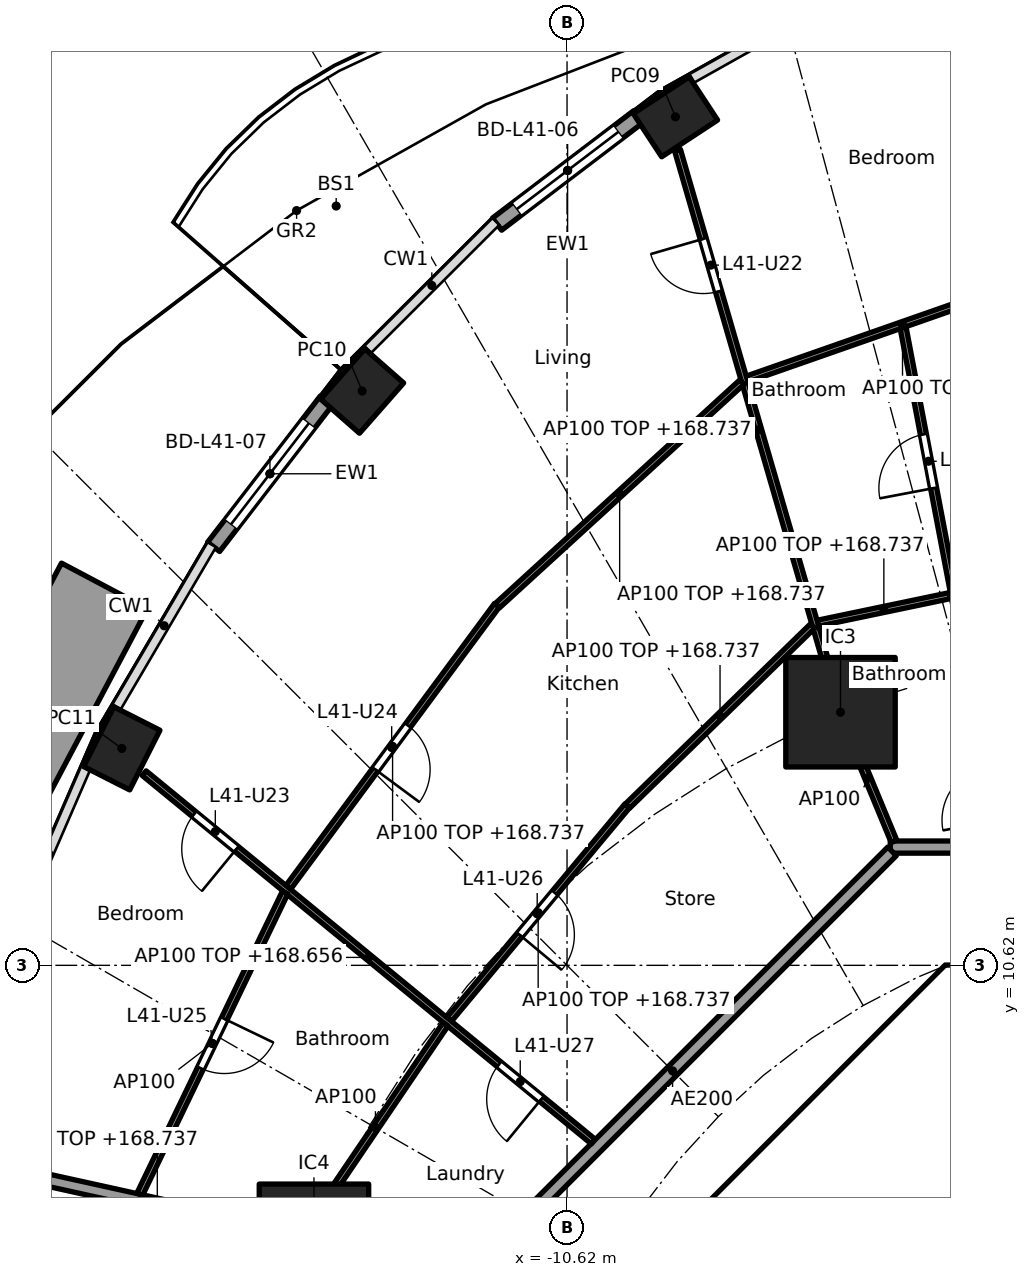
"""IFC4 building model, lengths in metres.
Left out: names, types, materials, properties, quantities, classifications, styles, units other than length and angle.
Written with IfcOpenShell. Run it as: python <this file> out.ifc"""

import sys

from ifc_helpers import new_model, si_unit, direction, frame, frame_2d, origin, origin_2d, place, context, subcontext, project, spatial, polyline, rectangle, hollow_rectangle, outline, extrude, element, fill, save


model = new_model("IFC4")
c1 = context("Model", 3, precision=1e-05, world=origin(), true_north=direction((0.0, 1.0)))
c2 = subcontext(c1, "Body", "Model", "MODEL_VIEW")
j1 = project(units=[si_unit("LENGTHUNIT", "METRE"), si_unit("PLANEANGLEUNIT", "RADIAN")], contexts=[c1])
p1 = place(None, origin())
s1 = spatial("IfcSite", under=j1, at=p1, CompositionType="ELEMENT")
p2 = place(p1, origin())
s2 = spatial("IfcBuilding", under=s1, at=p2, CompositionType="ELEMENT")
p3 = place(p2, frame((0.0, 0.0, 165.9)))
s3 = spatial("IfcBuildingStorey", under=s2, at=p3, CompositionType="ELEMENT", Elevation=165.9)
for number, where, z_axis, x_axis in (
    (1, (-8.837, 24.573, -0.26), (0.0, 0.0, 1.0), (-0.836, -0.549, 0.0)),
    (2, (-13.989, 20.064, -0.26), (0.0, 0.0, 1.0), (-0.66, -0.751, 0.0)),
    (3, (-17.942, 14.188, -0.26), (0.0, 0.0, 1.0), (-0.452, -0.892, 0.0)),
):
    element("IfcColumn", number, at=place(p3, frame(where, z_axis=z_axis, x_axis=x_axis)), inside=s3, PredefinedType="COLUMN", context=c2, shape_type="SweptSolid", body=[
        extrude(hollow_rectangle(XDim=1.1, YDim=0.85, WallThickness=0.036, at=origin_2d()), origin(), (0.0, 0.0, 1.0), 3.96),
    ])
for number, where, z_axis, x_axis in (
    (4, (-6.123, 14.782, 0.0), (0.0, 0.0, 1.0), (1.0, 0.0, 0.0)),
    (5, (-14.782, 6.123, 0.0), (0.0, 0.0, 1.0), (1.0, 0.0, 0.0)),
):
    element("IfcColumn", number, at=place(p3, frame(where, z_axis=z_axis, x_axis=x_axis)), inside=s3, PredefinedType="COLUMN", context=c2, shape_type="SweptSolid", body=[
        extrude(rectangle(XDim=1.8, YDim=1.8, at=origin_2d()), origin(), (0.0, 0.0, 1.0), 3.7),
    ])
p4 = place(p3, frame((-11.772, 22.809, 0.0), z_axis=(0.0, 0.0, 1.0), x_axis=(0.796055733703, 0.60522332146, 0.0)))
e6 = element("IfcWall", 6, at=p4, inside=s3, PredefinedType="SOLIDWALL", context=c2, shape_type="SweptSolid", body=[
    extrude(rectangle(XDim=2.917, YDim=0.25, at=frame_2d((1.458, 0.0))), origin(), (0.0, 0.0, 1.0), 3.44),
])
p5 = place(p4, frame((0.408, 0.0, 0.0)))
e7 = element("IfcOpeningElement", 7, at=p5, cuts=e6, PredefinedType="OPENING", context=c2, shape_type="SweptSolid", body=[
    extrude(rectangle(XDim=2.1, YDim=2.4, at=frame_2d((1.05, 1.2))), frame((0.0, 0.135, 0.0), z_axis=(0.0, -1.0, 0.0), x_axis=(1.0, 0.0, 0.0)), (0.0, 0.0, 1.0), 0.27),
])
p6 = place(p3, frame((-16.432, 17.502, 0.0), z_axis=(0.0, 0.0, 1.0), x_axis=(0.610437428894, 0.79206448311, 0.0)))
e8 = element("IfcWall", 8, at=p6, inside=s3, PredefinedType="SOLIDWALL", context=c2, shape_type="SweptSolid", body=[
    extrude(rectangle(XDim=3.035, YDim=0.25, at=frame_2d((1.518, 0.0))), origin(), (0.0, 0.0, 1.0), 3.44),
])
p7 = place(p6, frame((0.468, 0.0, 0.0)))
e9 = element("IfcOpeningElement", 9, at=p7, cuts=e8, PredefinedType="OPENING", context=c2, shape_type="SweptSolid", body=[
    extrude(rectangle(XDim=2.1, YDim=2.4, at=frame_2d((1.05, 1.2))), frame((0.0, 0.135, 0.0), z_axis=(0.0, -1.0, 0.0), x_axis=(1.0, 0.0, 0.0)), (0.0, 0.0, 1.0), 0.27),
])
p8 = place(p3, frame((-18.227, 16.86, 0.0), z_axis=(0.0, 0.0, 1.0), x_axis=(-0.467931103726, -0.883764947351, 0.0)))
e10 = element("IfcWall", 10, at=p8, inside=s3, PredefinedType="SOLIDWALL", context=c2, shape_type="SweptSolid", body=[
    extrude(rectangle(XDim=5.947, YDim=1.6, at=frame_2d((2.973, 0.0))), origin(), (0.0, 0.0, 1.0), 1.1),
])
p9 = place(p3, frame((-4.613, 9.988, 0.0), z_axis=(0.0, 0.0, 1.0), x_axis=(-0.707106781187, -0.707106781187, 0.0)))
e11 = element("IfcWall", 11, at=p9, inside=s3, PredefinedType="SHEAR", context=c2, shape_type="SweptSolid", body=[
    extrude(rectangle(XDim=7.602, YDim=0.6, at=frame_2d((3.801, 0.0))), origin(), (0.0, 0.0, 1.0), 3.44),
])
p10 = place(p9, frame((0.351, 0.0, 0.0)))
e12 = element("IfcOpeningElement", 12, at=p10, cuts=e11, PredefinedType="OPENING", context=c2, shape_type="SweptSolid", body=[
    extrude(rectangle(XDim=1.1, YDim=2.1, at=frame_2d((0.55, 1.05))), frame((0.0, 0.31, 0.0), z_axis=(0.0, -1.0, 0.0), x_axis=(1.0, 0.0, 0.0)), (0.0, 0.0, 1.0), 0.62),
])
p11 = place(p3, frame((-5.8, 4.3, 0.0), z_axis=(0.0, 0.0, 1.0), x_axis=(0.0, 1.0, 0.0)))
e13 = element("IfcWall", 13, at=p11, inside=s3, PredefinedType="PARTITIONING", context=c2, shape_type="SweptSolid", body=[
    extrude(rectangle(XDim=3.927, YDim=0.15, at=frame_2d((1.963, 0.0))), origin(), (0.0, 0.0, 1.0), 3.44),
])
p12 = place(p11, frame((1.551, 0.0, 0.0)))
e14 = element("IfcOpeningElement", 14, at=p12, cuts=e13, PredefinedType="OPENING", context=c2, shape_type="SweptSolid", body=[
    extrude(rectangle(XDim=0.9, YDim=2.1, at=frame_2d((0.45, 1.05))), frame((0.0, 0.085, 0.0), z_axis=(0.0, -1.0, 0.0), x_axis=(1.0, 0.0, 0.0)), (0.0, 0.0, 1.0), 0.17),
])
p13 = place(p3, origin())
e15 = element("IfcWall", 15, at=p13, inside=s3, PredefinedType="SHEAR", context=c2, shape_type="SweptSolid", body=[
    extrude(outline(polyline([(-4.152, 10.025), (-4.401, 9.776), (-4.825, 10.2), (-4.401, 10.625), (4.401, 10.625), (4.825, 10.2), (4.401, 9.776), (4.152, 10.025), (-4.152, 10.025)])), origin(), (0.0, 0.0, 1.0), 3.44),
])
p14 = place(p3, frame((-14.831, 6.134, 0.0), z_axis=(0.0, 0.0, 1.0), x_axis=(-0.976568396888, 0.215207263354, 0.0)))
e16 = element("IfcWall", 16, at=p14, inside=s3, PredefinedType="PARTITIONING", context=c2, shape_type="SweptSolid", body=[
    extrude(rectangle(XDim=5.177, YDim=0.2, at=frame_2d((2.588, 0.0))), origin(), (0.0, 0.0, 1.0), 2.837),
])
p15 = place(p3, frame((5.104, 12.565, 0.0), z_axis=(0.0, 0.0, 1.0), x_axis=(-1.0, 0.0, 0.0)))
e17 = element("IfcWall", 17, at=p15, inside=s3, PredefinedType="PARTITIONING", context=c2, shape_type="SweptSolid", body=[
    extrude(rectangle(XDim=10.409, YDim=0.2, at=frame_2d((5.205, 0.0))), origin(), (0.0, 0.0, 1.0), 3.44),
])
p16 = place(p15, frame((6.339, 0.0, 0.0)))
e18 = element("IfcOpeningElement", 18, at=p16, cuts=e17, PredefinedType="OPENING", context=c2, shape_type="SweptSolid", body=[
    extrude(rectangle(XDim=1.0, YDim=2.1, at=frame_2d((0.5, 1.05))), frame((0.0, 0.11, 0.0), z_axis=(0.0, -1.0, 0.0), x_axis=(1.0, 0.0, 0.0)), (0.0, 0.0, 1.0), 0.22),
])
p17 = place(p3, frame((-5.275, 12.494, 0.0), z_axis=(0.0, 0.0, 1.0), x_axis=(-0.707106781187, -0.707106781187, 0.0)))
e19 = element("IfcWall", 19, at=p17, inside=s3, PredefinedType="PARTITIONING", context=c2, shape_type="SweptSolid", body=[
    extrude(rectangle(XDim=10.209, YDim=0.2, at=frame_2d((5.104, 0.0))), origin(), (0.0, 0.0, 1.0), 3.44),
])
p18 = place(p3, frame((-2.546, 22.051, 0.0), z_axis=(0.0, 0.0, 1.0), x_axis=(-0.943911038661, -0.330199865375, 0.0)))
e20 = element("IfcWall", 20, at=p18, inside=s3, PredefinedType="PARTITIONING", context=c2, shape_type="SweptSolid", body=[
    extrude(rectangle(XDim=5.417, YDim=0.1, at=frame_2d((2.709, 0.0))), origin(), (0.0, 0.0, 1.0), 2.837),
])
p19 = place(p3, frame((-3.488, 12.663, 0.0), z_axis=(0.0, 0.0, 1.0), x_axis=(-0.186783185485, 0.982401161247, 0.0)))
e21 = element("IfcWall", 21, at=p19, inside=s3, PredefinedType="PARTITIONING", context=c2, shape_type="SweptSolid", body=[
    extrude(rectangle(XDim=8.595, YDim=0.1, at=frame_2d((4.298, 0.0))), origin(), (0.0, 0.0, 1.0), 2.756),
])
p20 = place(p19, frame((0.35, 0.0, 0.0)))
e22 = element("IfcOpeningElement", 22, at=p20, cuts=e21, PredefinedType="OPENING", context=c2, shape_type="SweptSolid", body=[
    extrude(rectangle(XDim=0.9, YDim=2.1, at=frame_2d((0.45, 1.05))), frame((0.0, 0.06, 0.0), z_axis=(0.0, -1.0, 0.0), x_axis=(1.0, 0.0, 0.0)), (0.0, 0.0, 1.0), 0.12),
])
p21 = place(p19, frame((5.908, 0.0, 0.0)))
e23 = element("IfcOpeningElement", 23, at=p21, cuts=e21, PredefinedType="OPENING", context=c2, shape_type="SweptSolid", body=[
    extrude(rectangle(XDim=0.9, YDim=2.1, at=frame_2d((0.45, 1.05))), frame((0.0, 0.06, 0.0), z_axis=(0.0, -1.0, 0.0), x_axis=(1.0, 0.0, 0.0)), (0.0, 0.0, 1.0), 0.12),
])
p22 = place(p3, frame((-4.324, 16.699, 0.0), z_axis=(0.0, 0.0, 1.0), x_axis=(-0.978908011866, -0.204301503432, 0.0)))
e24 = element("IfcWall", 24, at=p22, inside=s3, PredefinedType="PARTITIONING", context=c2, shape_type="SweptSolid", body=[
    extrude(rectangle(XDim=2.218, YDim=0.1, at=frame_2d((1.109, 0.0))), origin(), (0.0, 0.0, 1.0), 2.837),
])
p23 = place(p3, frame((-5.243, 12.657, 0.0), z_axis=(0.0, 0.0, 1.0), x_axis=(-0.382719158442, 0.923864733477, 0.0)))
e25 = element("IfcWall", 25, at=p23, inside=s3, PredefinedType="PARTITIONING", context=c2, shape_type="SweptSolid", body=[
    extrude(rectangle(XDim=2.25, YDim=0.1, at=frame_2d((1.125, 0.0))), origin(), (0.0, 0.0, 1.0), 3.44),
])
p24 = place(p3, frame((-6.137, 14.83, 0.0), z_axis=(0.0, 0.0, 1.0), x_axis=(-0.278461169897, 0.96044748782, 0.0)))
e26 = element("IfcWall", 26, at=p24, inside=s3, PredefinedType="PARTITIONING", context=c2, shape_type="SweptSolid", body=[
    extrude(rectangle(XDim=9.573, YDim=0.1, at=frame_2d((4.787, 0.0))), origin(), (0.0, 0.0, 1.0), 2.837),
])
p25 = place(p24, frame((7.156, 0.0, 0.0)))
e27 = element("IfcOpeningElement", 27, at=p25, cuts=e26, PredefinedType="OPENING", context=c2, shape_type="SweptSolid", body=[
    extrude(rectangle(XDim=0.9, YDim=2.1, at=frame_2d((0.45, 1.05))), frame((0.0, 0.06, 0.0), z_axis=(0.0, -1.0, 0.0), x_axis=(1.0, 0.0, 0.0)), (0.0, 0.0, 1.0), 0.12),
])
p26 = place(p3, frame((-6.58, 16.201, 0.0), z_axis=(0.0, 0.0, 1.0), x_axis=(-0.716946269374, -0.697128429223, 0.0)))
e28 = element("IfcWall", 28, at=p26, inside=s3, PredefinedType="PARTITIONING", context=c2, shape_type="SweptSolid", body=[
    extrude(rectangle(XDim=4.25, YDim=0.1, at=frame_2d((2.125, 0.0))), origin(), (0.0, 0.0, 1.0), 2.837),
])
p27 = place(p3, frame((-7.744, 20.212, 0.0), z_axis=(0.0, 0.0, 1.0), x_axis=(-0.738051761282, -0.674744097913, 0.0)))
e29 = element("IfcWall", 29, at=p27, inside=s3, PredefinedType="PARTITIONING", context=c2, shape_type="SweptSolid", body=[
    extrude(rectangle(XDim=5.449, YDim=0.1, at=frame_2d((2.725, 0.0))), origin(), (0.0, 0.0, 1.0), 2.837),
])
p28 = place(p3, frame((-9.631, 13.242, 0.0), z_axis=(0.0, 0.0, 1.0), x_axis=(-0.640315711982, -0.768111833647, 0.0)))
e30 = element("IfcWall", 30, at=p28, inside=s3, PredefinedType="PARTITIONING", context=c2, shape_type="SweptSolid", body=[
    extrude(rectangle(XDim=4.572, YDim=0.1, at=frame_2d((2.286, 0.0))), origin(), (0.0, 0.0, 1.0), 2.837),
])
p29 = place(p28, frame((1.861, 0.0, 0.0)))
e31 = element("IfcOpeningElement", 31, at=p29, cuts=e30, PredefinedType="OPENING", context=c2, shape_type="SweptSolid", body=[
    extrude(rectangle(XDim=0.9, YDim=2.1, at=frame_2d((0.45, 1.05))), frame((0.0, 0.06, 0.0), z_axis=(0.0, -1.0, 0.0), x_axis=(1.0, 0.0, 0.0)), (0.0, 0.0, 1.0), 0.12),
])
p30 = place(p3, frame((-11.773, 16.542, 0.0), z_axis=(0.0, 0.0, 1.0), x_axis=(-0.594694305999, -0.803951915485, 0.0)))
e32 = element("IfcWall", 32, at=p30, inside=s3, PredefinedType="PARTITIONING", context=c2, shape_type="SweptSolid", body=[
    extrude(rectangle(XDim=5.772, YDim=0.1, at=frame_2d((2.886, 0.0))), origin(), (0.0, 0.0, 1.0), 2.837),
])
p31 = place(p30, frame((2.461, 0.0, 0.0)))
e33 = element("IfcOpeningElement", 33, at=p31, cuts=e32, PredefinedType="OPENING", context=c2, shape_type="SweptSolid", body=[
    extrude(rectangle(XDim=0.9, YDim=2.1, at=frame_2d((0.45, 1.05))), frame((0.0, 0.06, 0.0), z_axis=(0.0, -1.0, 0.0), x_axis=(1.0, 0.0, 0.0)), (0.0, 0.0, 1.0), 0.12),
])
p32 = place(p3, frame((-10.189, 7.721, 0.0), z_axis=(0.0, 0.0, 1.0), x_axis=(-0.773134429339, 0.634242188892, 0.0)))
e34 = element("IfcWall", 34, at=p32, inside=s3, PredefinedType="PARTITIONING", context=c2, shape_type="SweptSolid", body=[
    extrude(rectangle(XDim=9.552, YDim=0.1, at=frame_2d((4.776, 0.0))), origin(), (0.0, 0.0, 1.0), 2.756),
])
p33 = place(p32, frame((7.59, 0.0, 0.0)))
e35 = element("IfcOpeningElement", 35, at=p33, cuts=e34, PredefinedType="OPENING", context=c2, shape_type="SweptSolid", body=[
    extrude(rectangle(XDim=0.9, YDim=2.1, at=frame_2d((0.45, 1.05))), frame((0.0, 0.06, 0.0), z_axis=(0.0, -1.0, 0.0), x_axis=(1.0, 0.0, 0.0)), (0.0, 0.0, 1.0), 0.12),
])
p34 = place(p32, frame((1.104, 0.0, 0.0)))
e36 = element("IfcOpeningElement", 36, at=p34, cuts=e34, PredefinedType="OPENING", context=c2, shape_type="SweptSolid", body=[
    extrude(rectangle(XDim=0.9, YDim=2.1, at=frame_2d((0.45, 1.05))), frame((0.0, 0.06, 0.0), z_axis=(0.0, -1.0, 0.0), x_axis=(1.0, 0.0, 0.0)), (0.0, 0.0, 1.0), 0.12),
])
p35 = place(p3, frame((-12.619, 9.65, 0.0), z_axis=(0.0, 0.0, 1.0), x_axis=(-0.561046521684, -0.82778427172, 0.0)))
e37 = element("IfcWall", 37, at=p35, inside=s3, PredefinedType="PARTITIONING", context=c2, shape_type="SweptSolid", body=[
    extrude(rectangle(XDim=4.109, YDim=0.1, at=frame_2d((2.054, 0.0))), origin(), (0.0, 0.0, 1.0), 3.44),
])
p36 = place(p3, frame((-15.257, 11.816, 0.0), z_axis=(0.0, 0.0, 1.0), x_axis=(-0.434027506504, -0.900899619046, 0.0)))
e38 = element("IfcWall", 38, at=p36, inside=s3, PredefinedType="PARTITIONING", context=c2, shape_type="SweptSolid", body=[
    extrude(rectangle(XDim=5.508, YDim=0.1, at=frame_2d((2.754, 0.0))), origin(), (0.0, 0.0, 1.0), 3.44),
])
p37 = place(p36, frame((2.304, 0.0, 0.0)))
e39 = element("IfcOpeningElement", 39, at=p37, cuts=e38, PredefinedType="OPENING", context=c2, shape_type="SweptSolid", body=[
    extrude(rectangle(XDim=0.9, YDim=2.1, at=frame_2d((0.45, 1.05))), frame((0.0, 0.06, 0.0), z_axis=(0.0, -1.0, 0.0), x_axis=(1.0, 0.0, 0.0)), (0.0, 0.0, 1.0), 0.12),
])
p38 = place(p5, origin())
e40 = element("IfcDoor", 40, at=p38, inside=s3, OperationType="SLIDING_TO_LEFT", PredefinedType="DOOR", context=c2, shape_type="SweptSolid", body=[
    extrude(rectangle(XDim=2.1, YDim=2.4, at=frame_2d((1.05, 1.2))), frame((0.0, 0.025, 0.0), z_axis=(0.0, -1.0, 0.0), x_axis=(1.0, 0.0, 0.0)), (0.0, 0.0, 1.0), 0.05),
])
fill(e7, e40)
p39 = place(p7, origin())
e41 = element("IfcDoor", 41, at=p39, inside=s3, OperationType="SLIDING_TO_LEFT", PredefinedType="DOOR", context=c2, shape_type="SweptSolid", body=[
    extrude(rectangle(XDim=2.1, YDim=2.4, at=frame_2d((1.05, 1.2))), frame((0.0, 0.025, 0.0), z_axis=(0.0, -1.0, 0.0), x_axis=(1.0, 0.0, 0.0)), (0.0, 0.0, 1.0), 0.05),
])
fill(e9, e41)
p40 = place(p10, origin())
e42 = element("IfcDoor", 42, at=p40, inside=s3, OperationType="SINGLE_SWING_LEFT", PredefinedType="DOOR", context=c2, shape_type="SweptSolid", body=[
    extrude(rectangle(XDim=1.1, YDim=2.1, at=frame_2d((0.55, 1.05))), frame((0.0, 0.025, 0.0), z_axis=(0.0, -1.0, 0.0), x_axis=(1.0, 0.0, 0.0)), (0.0, 0.0, 1.0), 0.05),
])
fill(e12, e42)
p41 = place(p21, origin())
e43 = element("IfcDoor", 43, at=p41, inside=s3, OperationType="SINGLE_SWING_LEFT", PredefinedType="DOOR", context=c2, shape_type="SweptSolid", body=[
    extrude(rectangle(XDim=0.9, YDim=2.1, at=frame_2d((0.45, 1.05))), frame((0.0, 0.025, 0.0), z_axis=(0.0, -1.0, 0.0), x_axis=(1.0, 0.0, 0.0)), (0.0, 0.0, 1.0), 0.05),
])
fill(e23, e43)
p42 = place(p25, origin())
e44 = element("IfcDoor", 44, at=p42, inside=s3, OperationType="SINGLE_SWING_RIGHT", PredefinedType="DOOR", context=c2, shape_type="SweptSolid", body=[
    extrude(rectangle(XDim=0.9, YDim=2.1, at=frame_2d((0.45, 1.05))), frame((0.0, 0.025, 0.0), z_axis=(0.0, -1.0, 0.0), x_axis=(1.0, 0.0, 0.0)), (0.0, 0.0, 1.0), 0.05),
])
fill(e27, e44)
p43 = place(p33, origin())
e45 = element("IfcDoor", 45, at=p43, inside=s3, OperationType="SINGLE_SWING_LEFT", PredefinedType="DOOR", context=c2, shape_type="SweptSolid", body=[
    extrude(rectangle(XDim=0.9, YDim=2.1, at=frame_2d((0.45, 1.05))), frame((0.0, 0.025, 0.0), z_axis=(0.0, -1.0, 0.0), x_axis=(1.0, 0.0, 0.0)), (0.0, 0.0, 1.0), 0.05),
])
fill(e35, e45)
p44 = place(p31, origin())
e46 = element("IfcDoor", 46, at=p44, inside=s3, OperationType="SINGLE_SWING_RIGHT", PredefinedType="DOOR", context=c2, shape_type="SweptSolid", body=[
    extrude(rectangle(XDim=0.9, YDim=2.1, at=frame_2d((0.45, 1.05))), frame((0.0, 0.025, 0.0), z_axis=(0.0, -1.0, 0.0), x_axis=(1.0, 0.0, 0.0)), (0.0, 0.0, 1.0), 0.05),
])
fill(e33, e46)
p45 = place(p37, origin())
e47 = element("IfcDoor", 47, at=p45, inside=s3, OperationType="SINGLE_SWING_LEFT", PredefinedType="DOOR", context=c2, shape_type="SweptSolid", body=[
    extrude(rectangle(XDim=0.9, YDim=2.1, at=frame_2d((0.45, 1.05))), frame((0.0, 0.025, 0.0), z_axis=(0.0, -1.0, 0.0), x_axis=(1.0, 0.0, 0.0)), (0.0, 0.0, 1.0), 0.05),
])
fill(e39, e47)
p46 = place(p29, origin())
e48 = element("IfcDoor", 48, at=p46, inside=s3, OperationType="SINGLE_SWING_RIGHT", PredefinedType="DOOR", context=c2, shape_type="SweptSolid", body=[
    extrude(rectangle(XDim=0.9, YDim=2.1, at=frame_2d((0.45, 1.05))), frame((0.0, 0.025, 0.0), z_axis=(0.0, -1.0, 0.0), x_axis=(1.0, 0.0, 0.0)), (0.0, 0.0, 1.0), 0.05),
])
fill(e31, e48)
p47 = place(p34, origin())
e49 = element("IfcDoor", 49, at=p47, inside=s3, OperationType="SINGLE_SWING_LEFT", PredefinedType="DOOR", context=c2, shape_type="SweptSolid", body=[
    extrude(rectangle(XDim=0.9, YDim=2.1, at=frame_2d((0.45, 1.05))), frame((0.0, 0.025, 0.0), z_axis=(0.0, -1.0, 0.0), x_axis=(1.0, 0.0, 0.0)), (0.0, 0.0, 1.0), 0.05),
])
fill(e36, e49)
save(model, sys.argv[1])
